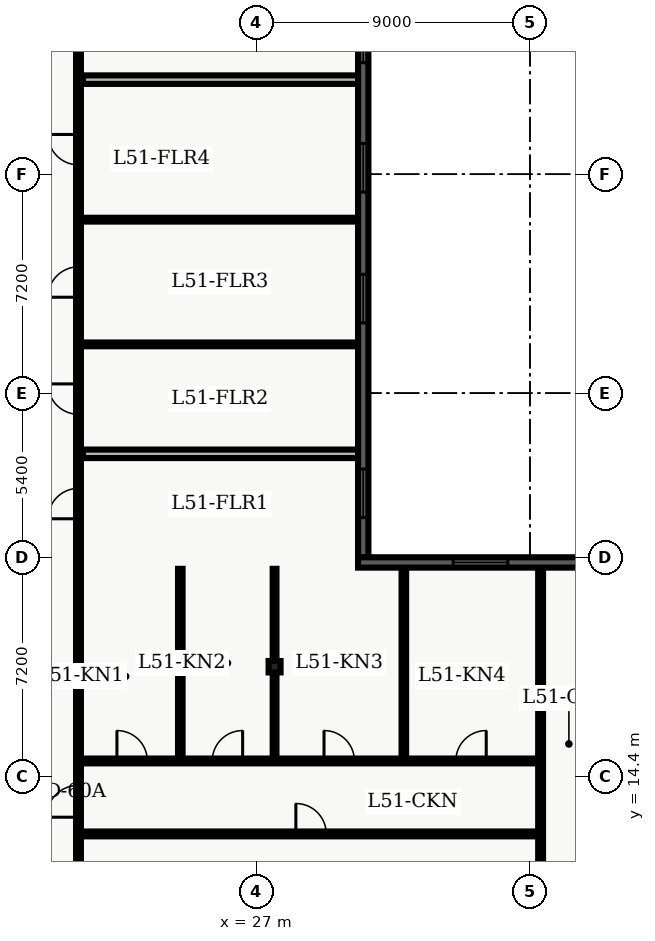
"""IFC4 building model, lengths in metres.
Left out: names, types, materials, properties, quantities, classifications, styles, units other than length and angle.
Written with IfcOpenShell. Run it as: python <this file> out.ifc"""

import sys

from ifc_helpers import new_model, entity, si_unit, converted_unit, direction, frame, origin_with_axes, origin_2d_with_axis, place, context, subcontext, project, spatial, polyline, rectangle, i_section, outline, extrude, element, fill, save


model = new_model("IFC4")
c1 = context("Model", 3, precision=1e-05, world=origin_with_axes(), true_north=direction((0.0, 1.0)))
c2 = subcontext(c1, "Body", "Model", "MODEL_VIEW")
j1 = project(units=[si_unit("LENGTHUNIT", "METRE"), converted_unit("PLANEANGLEUNIT", "DEGREE", entity("IfcPlaneAngleMeasure", 0.017), si_unit("PLANEANGLEUNIT", "RADIAN"), dimensions=[0, 0, 0, 0, 0, 0, 0])], contexts=[c1])
p1 = place(None, origin_with_axes())
s1 = spatial("IfcSite", under=j1, at=p1, CompositionType="ELEMENT")
p2 = place(p1, origin_with_axes())
s2 = spatial("IfcBuilding", under=s1, at=p2, CompositionType="ELEMENT")
p3 = place(p2, frame((0.0, 0.0, 208.2), z_axis=(0.0, 0.0, 1.0), x_axis=(1.0, 0.0, 0.0)))
s3 = spatial("IfcBuildingStorey", under=s2, at=p3, CompositionType="ELEMENT", Elevation=208.2)
p4 = place(p3, frame((27.6, 18.0, 0.0), z_axis=(0.0, 0.0, 1.0), x_axis=(1.0, 0.0, 0.0)))
e1 = element("IfcColumn", 1, at=p4, inside=s3, PredefinedType="COLUMN", context=c2, shape_type="SweptSolid", body=[
    extrude(i_section(OverallWidth=0.394, OverallDepth=0.375, WebThickness=0.017, FlangeThickness=0.028, FilletRadius=0.02, at=origin_2d_with_axis()), origin_with_axes(), (0.0, 0.0, 1.0), 3.9),
])
p5 = place(p3, frame((21.15, 7.8, 0.0), z_axis=(0.0, 0.0, 1.0), x_axis=(0.0, 1.0, 0.0)))
e2 = element("IfcWall", 2, at=p5, inside=s3, PredefinedType="PARTITIONING", context=c2, shape_type="SweptSolid", body=[
    extrude(outline(polyline([(0.0, -0.08), (32.7, -0.08), (32.7, 0.08), (0.0, 0.08), (0.0, -0.08)])), origin_with_axes(), (0.0, 0.0, 1.0), 2.7),
])
p6 = place(p5, frame((15.566, 0.0, 0.0), z_axis=(0.0, 0.0, 1.0), x_axis=(1.0, 0.0, 0.0)))
e3 = element("IfcOpeningElement", 3, at=p6, cuts=e2, PredefinedType="OPENING", context=c2, shape_type="SweptSolid", body=[
    extrude(rectangle(XDim=1.0, YDim=0.18, at=origin_2d_with_axis()), origin_with_axes(), (0.0, 0.0, 1.0), 2.15),
])
p7 = place(p5, frame((19.003, 0.0, 0.0), z_axis=(0.0, 0.0, 1.0), x_axis=(1.0, 0.0, 0.0)))
e4 = element("IfcOpeningElement", 4, at=p7, cuts=e2, PredefinedType="OPENING", context=c2, shape_type="SweptSolid", body=[
    extrude(rectangle(XDim=1.0, YDim=0.18, at=origin_2d_with_axis()), origin_with_axes(), (0.0, 0.0, 1.0), 2.15),
])
p8 = place(p5, frame((22.854, 0.0, 0.0), z_axis=(0.0, 0.0, 1.0), x_axis=(1.0, 0.0, 0.0)))
e5 = element("IfcOpeningElement", 5, at=p8, cuts=e2, PredefinedType="OPENING", context=c2, shape_type="SweptSolid", body=[
    extrude(rectangle(XDim=1.0, YDim=0.18, at=origin_2d_with_axis()), origin_with_axes(), (0.0, 0.0, 1.0), 2.15),
])
p9 = place(p5, frame((27.208, 0.0, 0.0), z_axis=(0.0, 0.0, 1.0), x_axis=(1.0, 0.0, 0.0)))
e6 = element("IfcOpeningElement", 6, at=p9, cuts=e2, PredefinedType="OPENING", context=c2, shape_type="SweptSolid", body=[
    extrude(rectangle(XDim=1.0, YDim=0.18, at=origin_2d_with_axis()), origin_with_axes(), (0.0, 0.0, 1.0), 2.15),
])
p10 = place(p5, frame((31.041, 0.0, 0.0), z_axis=(0.0, 0.0, 1.0), x_axis=(1.0, 0.0, 0.0)))
e7 = element("IfcOpeningElement", 7, at=p10, cuts=e2, PredefinedType="OPENING", context=c2, shape_type="SweptSolid", body=[
    extrude(rectangle(XDim=1.0, YDim=0.18, at=origin_2d_with_axis()), origin_with_axes(), (0.0, 0.0, 1.0), 2.15),
])
p11 = place(p5, frame((5.775, 0.0, 0.0), z_axis=(0.0, 0.0, 1.0), x_axis=(1.0, 0.0, 0.0)))
e8 = element("IfcOpeningElement", 8, at=p11, cuts=e2, PredefinedType="OPENING", context=c2, shape_type="SweptSolid", body=[
    extrude(rectangle(XDim=1.05, YDim=0.18, at=origin_2d_with_axis()), origin_with_axes(), (0.0, 0.0, 1.0), 2.15),
])
p12 = place(p3, frame((21.3, 25.003, 0.0), z_axis=(0.0, 0.0, 1.0), x_axis=(1.0, 0.0, 0.0)))
e9 = element("IfcWall", 9, at=p12, inside=s3, PredefinedType="PARTITIONING", context=c2, shape_type="SweptSolid", body=[
    extrude(outline(polyline([(0.0, -0.14), (9.051, -0.14), (9.051, 0.14), (0.0, 0.14), (0.0, -0.14)])), origin_with_axes(), (0.0, 0.0, 1.0), 2.7),
])
for number, where, z_axis, x_axis in (
    (10, (21.3, 28.603, 0.0), (0.0, 0.0, 1.0), (1.0, 0.0, 0.0)),
    (11, (21.3, 32.705, 0.0), (0.0, 0.0, 1.0), (1.0, 0.0, 0.0)),
):
    element("IfcWall", number, at=place(p3, frame(where, z_axis=z_axis, x_axis=x_axis)), inside=s3, PredefinedType="PARTITIONING", context=c2, shape_type="SweptSolid", body=[
        extrude(outline(polyline([(0.0, -0.062), (9.051, -0.062), (9.051, 0.062), (0.0, 0.062), (0.0, -0.062)])), origin_with_axes(), (0.0, 0.0, 1.0), 2.7),
    ])
p13 = place(p3, frame((21.3, 37.311, 0.0), z_axis=(0.0, 0.0, 1.0), x_axis=(1.0, 0.0, 0.0)))
e12 = element("IfcWall", 12, at=p13, inside=s3, PredefinedType="PARTITIONING", context=c2, shape_type="SweptSolid", body=[
    extrude(outline(polyline([(0.0, -0.14), (9.051, -0.14), (9.051, 0.14), (0.0, 0.14), (0.0, -0.14)])), origin_with_axes(), (0.0, 0.0, 1.0), 2.7),
])
p14 = place(p3, frame((21.15, 12.5, 0.0), z_axis=(0.0, 0.0, 1.0), x_axis=(1.0, 0.0, 0.0)))
e13 = element("IfcWall", 13, at=p14, inside=s3, PredefinedType="PARTITIONING", context=c2, shape_type="SweptSolid", body=[
    extrude(outline(polyline([(0.0, -0.08), (15.2, -0.08), (15.2, 0.08), (0.0, 0.08), (0.0, -0.08)])), origin_with_axes(), (0.0, 0.0, 1.0), 2.7),
])
p15 = place(p14, frame((7.65, 0.0, 0.0), z_axis=(0.0, 0.0, 1.0), x_axis=(1.0, 0.0, 0.0)))
e14 = element("IfcOpeningElement", 14, at=p15, cuts=e13, PredefinedType="OPENING", context=c2, shape_type="SweptSolid", body=[
    extrude(rectangle(XDim=1.0, YDim=0.18, at=origin_2d_with_axis()), origin_with_axes(), (0.0, 0.0, 1.0), 2.15),
])
p16 = place(p3, frame((21.15, 14.9, 0.0), z_axis=(0.0, 0.0, 1.0), x_axis=(1.0, 0.0, 0.0)))
e15 = element("IfcWall", 15, at=p16, inside=s3, PredefinedType="PARTITIONING", context=c2, shape_type="SweptSolid", body=[
    extrude(outline(polyline([(0.0, -0.08), (15.2, -0.08), (15.2, 0.08), (0.0, 0.08), (0.0, -0.08)])), origin_with_axes(), (0.0, 0.0, 1.0), 2.7),
])
p17 = place(p16, frame((1.764, 0.0, 0.0), z_axis=(0.0, 0.0, 1.0), x_axis=(1.0, 0.0, 0.0)))
e16 = element("IfcOpeningElement", 16, at=p17, cuts=e15, PredefinedType="OPENING", context=c2, shape_type="SweptSolid", body=[
    extrude(rectangle(XDim=1.0, YDim=0.18, at=origin_2d_with_axis()), origin_with_axes(), (0.0, 0.0, 1.0), 2.15),
])
p18 = place(p16, frame((4.899, 0.0, 0.0), z_axis=(0.0, 0.0, 1.0), x_axis=(1.0, 0.0, 0.0)))
e17 = element("IfcOpeningElement", 17, at=p18, cuts=e15, PredefinedType="OPENING", context=c2, shape_type="SweptSolid", body=[
    extrude(rectangle(XDim=1.0, YDim=0.18, at=origin_2d_with_axis()), origin_with_axes(), (0.0, 0.0, 1.0), 2.15),
])
p19 = place(p16, frame((8.576, 0.0, 0.0), z_axis=(0.0, 0.0, 1.0), x_axis=(1.0, 0.0, 0.0)))
e18 = element("IfcOpeningElement", 18, at=p19, cuts=e15, PredefinedType="OPENING", context=c2, shape_type="SweptSolid", body=[
    extrude(rectangle(XDim=1.0, YDim=0.18, at=origin_2d_with_axis()), origin_with_axes(), (0.0, 0.0, 1.0), 2.15),
])
p20 = place(p16, frame((12.911, 0.0, 0.0), z_axis=(0.0, 0.0, 1.0), x_axis=(1.0, 0.0, 0.0)))
e19 = element("IfcOpeningElement", 19, at=p20, cuts=e15, PredefinedType="OPENING", context=c2, shape_type="SweptSolid", body=[
    extrude(rectangle(XDim=1.0, YDim=0.18, at=origin_2d_with_axis()), origin_with_axes(), (0.0, 0.0, 1.0), 2.15),
])
p21 = place(p3, frame((36.35, 4.35, 0.0), z_axis=(0.0, 0.0, 1.0), x_axis=(0.0, 1.0, 0.0)))
e20 = element("IfcWall", 20, at=p21, inside=s3, PredefinedType="PARTITIONING", context=c2, shape_type="SweptSolid", body=[
    extrude(outline(polyline([(0.0, -0.08), (16.95, -0.08), (16.95, 0.08), (0.0, 0.08), (0.0, -0.08)])), origin_with_axes(), (0.0, 0.0, 1.0), 2.7),
])
p22 = place(p3, frame((24.499, 15.02, 0.0), z_axis=(0.0, 0.0, 1.0), x_axis=(0.0, 1.0, 0.0)))
e21 = element("IfcWall", 21, at=p22, inside=s3, PredefinedType="PARTITIONING", context=c2, shape_type="SweptSolid", body=[
    extrude(outline(polyline([(0.0, -0.075), (6.2, -0.075), (6.2, 0.075), (0.0, 0.075), (0.0, -0.075)])), origin_with_axes(), (0.0, 0.0, 1.0), 2.7),
])
p23 = place(p3, frame((27.6, 15.02, 0.0), z_axis=(0.0, 0.0, 1.0), x_axis=(0.0, 1.0, 0.0)))
e22 = element("IfcWall", 22, at=p23, inside=s3, PredefinedType="PARTITIONING", context=c2, shape_type="SweptSolid", body=[
    extrude(outline(polyline([(0.0, -0.062), (6.2, -0.062), (6.2, 0.062), (0.0, 0.062), (0.0, -0.062)])), origin_with_axes(), (0.0, 0.0, 1.0), 2.7),
])
p24 = place(p3, frame((31.852, 15.02, 0.0), z_axis=(0.0, 0.0, 1.0), x_axis=(0.0, 1.0, 0.0)))
e23 = element("IfcWall", 23, at=p24, inside=s3, PredefinedType="PARTITIONING", context=c2, shape_type="SweptSolid", body=[
    extrude(outline(polyline([(0.0, -0.075), (6.245, -0.075), (6.245, 0.075), (0.0, 0.075), (0.0, -0.075)])), origin_with_axes(), (0.0, 0.0, 1.0), 2.7),
])
p25 = place(p3, frame((30.516, 41.62, 0.0), z_axis=(0.0, 0.0, 1.0), x_axis=(0.0, -1.0, 0.0)))
e24 = element("IfcWall", 24, at=p25, inside=s3, PredefinedType="SOLIDWALL", context=c2, shape_type="SweptSolid", body=[
    extrude(outline(polyline([(0.0, -0.17), (20.02, -0.17), (20.02, 0.17), (0.0, 0.17), (0.0, -0.17)])), origin_with_axes(), (0.0, 0.0, 1.0), 3.66),
])
p26 = place(p25, frame((2.952, 0.0, 0.45), z_axis=(0.0, 0.0, 1.0), x_axis=(1.0, 0.0, 0.0)))
e25 = element("IfcOpeningElement", 25, at=p26, cuts=e24, PredefinedType="OPENING", context=c2, shape_type="SweptSolid", body=[
    extrude(rectangle(XDim=1.6, YDim=0.36, at=origin_2d_with_axis()), origin_with_axes(), (0.0, 0.0, 1.0), 2.2),
])
p27 = place(p25, frame((7.207, 0.0, 0.45), z_axis=(0.0, 0.0, 1.0), x_axis=(1.0, 0.0, 0.0)))
e26 = element("IfcOpeningElement", 26, at=p27, cuts=e24, PredefinedType="OPENING", context=c2, shape_type="SweptSolid", body=[
    extrude(rectangle(XDim=1.6, YDim=0.36, at=origin_2d_with_axis()), origin_with_axes(), (0.0, 0.0, 1.0), 2.2),
])
p28 = place(p25, frame((11.512, 0.0, 0.45), z_axis=(0.0, 0.0, 1.0), x_axis=(1.0, 0.0, 0.0)))
e27 = element("IfcOpeningElement", 27, at=p28, cuts=e24, PredefinedType="OPENING", context=c2, shape_type="SweptSolid", body=[
    extrude(rectangle(XDim=1.6, YDim=0.36, at=origin_2d_with_axis()), origin_with_axes(), (0.0, 0.0, 1.0), 2.2),
])
p29 = place(p25, frame((17.917, 0.0, 0.45), z_axis=(0.0, 0.0, 1.0), x_axis=(1.0, 0.0, 0.0)))
e28 = element("IfcOpeningElement", 28, at=p29, cuts=e24, PredefinedType="OPENING", context=c2, shape_type="SweptSolid", body=[
    extrude(rectangle(XDim=1.6, YDim=0.36, at=origin_2d_with_axis()), origin_with_axes(), (0.0, 0.0, 1.0), 2.2),
])
p30 = place(p3, frame((30.346, 21.43, 0.0), z_axis=(0.0, 0.0, 1.0), x_axis=(1.0, 0.0, 0.0)))
e29 = element("IfcWall", 29, at=p30, inside=s3, PredefinedType="SOLIDWALL", context=c2, shape_type="SweptSolid", body=[
    extrude(outline(polyline([(0.0, -0.17), (8.054, -0.17), (8.054, 0.17), (0.0, 0.17), (0.0, -0.17)])), origin_with_axes(), (0.0, 0.0, 1.0), 3.66),
])
p31 = place(p30, frame((4.027, 0.0, 0.45), z_axis=(0.0, 0.0, 1.0), x_axis=(1.0, 0.0, 0.0)))
e30 = element("IfcOpeningElement", 30, at=p31, cuts=e29, PredefinedType="OPENING", context=c2, shape_type="SweptSolid", body=[
    extrude(rectangle(XDim=1.8, YDim=0.36, at=origin_2d_with_axis()), origin_with_axes(), (0.0, 0.0, 1.0), 2.1),
])
p32 = place(p5, frame((15.566, 0.0, 0.0), z_axis=(0.0, 0.0, 1.0), x_axis=(1.0, 0.0, 0.0)))
e31 = element("IfcDoor", 31, at=p32, inside=s3, OperationType="SINGLE_SWING_LEFT", PredefinedType="DOOR", context=c2, shape_type="SweptSolid", body=[
    extrude(rectangle(XDim=1.0, YDim=0.09, at=origin_2d_with_axis()), origin_with_axes(), (0.0, 0.0, 1.0), 2.15),
])
fill(e3, e31)
p33 = place(p5, frame((19.003, 0.0, 0.0), z_axis=(0.0, 0.0, 1.0), x_axis=(1.0, 0.0, 0.0)))
e32 = element("IfcDoor", 32, at=p33, inside=s3, OperationType="SINGLE_SWING_RIGHT", PredefinedType="DOOR", context=c2, shape_type="SweptSolid", body=[
    extrude(rectangle(XDim=1.0, YDim=0.09, at=origin_2d_with_axis()), origin_with_axes(), (0.0, 0.0, 1.0), 2.15),
])
fill(e4, e32)
p34 = place(p5, frame((22.854, 0.0, 0.0), z_axis=(0.0, 0.0, 1.0), x_axis=(1.0, 0.0, 0.0)))
e33 = element("IfcDoor", 33, at=p34, inside=s3, OperationType="SINGLE_SWING_LEFT", PredefinedType="DOOR", context=c2, shape_type="SweptSolid", body=[
    extrude(rectangle(XDim=1.0, YDim=0.09, at=origin_2d_with_axis()), origin_with_axes(), (0.0, 0.0, 1.0), 2.15),
])
fill(e5, e33)
p35 = place(p5, frame((27.208, 0.0, 0.0), z_axis=(0.0, 0.0, 1.0), x_axis=(1.0, 0.0, 0.0)))
e34 = element("IfcDoor", 34, at=p35, inside=s3, OperationType="SINGLE_SWING_RIGHT", PredefinedType="DOOR", context=c2, shape_type="SweptSolid", body=[
    extrude(rectangle(XDim=1.0, YDim=0.09, at=origin_2d_with_axis()), origin_with_axes(), (0.0, 0.0, 1.0), 2.15),
])
fill(e6, e34)
p36 = place(p5, frame((5.775, 0.0, 0.0), z_axis=(0.0, 0.0, 1.0), x_axis=(1.0, 0.0, 0.0)))
e35 = element("IfcDoor", 35, at=p36, inside=s3, OperationType="SINGLE_SWING_LEFT", PredefinedType="DOOR", context=c2, shape_type="SweptSolid", body=[
    extrude(rectangle(XDim=1.05, YDim=0.09, at=origin_2d_with_axis()), origin_with_axes(), (0.0, 0.0, 1.0), 2.15),
])
fill(e8, e35)
p37 = place(p14, frame((7.65, 0.0, 0.0), z_axis=(0.0, 0.0, 1.0), x_axis=(1.0, 0.0, 0.0)))
e36 = element("IfcDoor", 36, at=p37, inside=s3, OperationType="SINGLE_SWING_LEFT", PredefinedType="DOOR", context=c2, shape_type="SweptSolid", body=[
    extrude(rectangle(XDim=1.0, YDim=0.09, at=origin_2d_with_axis()), origin_with_axes(), (0.0, 0.0, 1.0), 2.15),
])
fill(e14, e36)
p38 = place(p16, frame((1.764, 0.0, 0.0), z_axis=(0.0, 0.0, 1.0), x_axis=(1.0, 0.0, 0.0)))
e37 = element("IfcDoor", 37, at=p38, inside=s3, OperationType="SINGLE_SWING_LEFT", PredefinedType="DOOR", context=c2, shape_type="SweptSolid", body=[
    extrude(rectangle(XDim=1.0, YDim=0.09, at=origin_2d_with_axis()), origin_with_axes(), (0.0, 0.0, 1.0), 2.15),
])
fill(e16, e37)
p39 = place(p16, frame((4.899, 0.0, 0.0), z_axis=(0.0, 0.0, 1.0), x_axis=(1.0, 0.0, 0.0)))
e38 = element("IfcDoor", 38, at=p39, inside=s3, OperationType="SINGLE_SWING_RIGHT", PredefinedType="DOOR", context=c2, shape_type="SweptSolid", body=[
    extrude(rectangle(XDim=1.0, YDim=0.09, at=origin_2d_with_axis()), origin_with_axes(), (0.0, 0.0, 1.0), 2.15),
])
fill(e17, e38)
p40 = place(p16, frame((8.576, 0.0, 0.0), z_axis=(0.0, 0.0, 1.0), x_axis=(1.0, 0.0, 0.0)))
e39 = element("IfcDoor", 39, at=p40, inside=s3, OperationType="SINGLE_SWING_LEFT", PredefinedType="DOOR", context=c2, shape_type="SweptSolid", body=[
    extrude(rectangle(XDim=1.0, YDim=0.09, at=origin_2d_with_axis()), origin_with_axes(), (0.0, 0.0, 1.0), 2.15),
])
fill(e18, e39)
p41 = place(p16, frame((12.911, 0.0, 0.0), z_axis=(0.0, 0.0, 1.0), x_axis=(1.0, 0.0, 0.0)))
e40 = element("IfcDoor", 40, at=p41, inside=s3, OperationType="SINGLE_SWING_RIGHT", PredefinedType="DOOR", context=c2, shape_type="SweptSolid", body=[
    extrude(rectangle(XDim=1.0, YDim=0.09, at=origin_2d_with_axis()), origin_with_axes(), (0.0, 0.0, 1.0), 2.15),
])
fill(e19, e40)
p42 = place(p25, frame((2.952, 0.0, 0.45), z_axis=(0.0, 0.0, 1.0), x_axis=(1.0, 0.0, 0.0)))
e41 = element("IfcWindow", 41, at=p42, inside=s3, PredefinedType="WINDOW", context=c2, shape_type="SweptSolid", body=[
    extrude(rectangle(XDim=1.6, YDim=0.09, at=origin_2d_with_axis()), origin_with_axes(), (0.0, 0.0, 1.0), 2.2),
])
fill(e25, e41)
p43 = place(p25, frame((7.207, 0.0, 0.45), z_axis=(0.0, 0.0, 1.0), x_axis=(1.0, 0.0, 0.0)))
e42 = element("IfcWindow", 42, at=p43, inside=s3, PredefinedType="WINDOW", context=c2, shape_type="SweptSolid", body=[
    extrude(rectangle(XDim=1.6, YDim=0.09, at=origin_2d_with_axis()), origin_with_axes(), (0.0, 0.0, 1.0), 2.2),
])
fill(e26, e42)
p44 = place(p25, frame((11.512, 0.0, 0.45), z_axis=(0.0, 0.0, 1.0), x_axis=(1.0, 0.0, 0.0)))
e43 = element("IfcWindow", 43, at=p44, inside=s3, PredefinedType="WINDOW", context=c2, shape_type="SweptSolid", body=[
    extrude(rectangle(XDim=1.6, YDim=0.09, at=origin_2d_with_axis()), origin_with_axes(), (0.0, 0.0, 1.0), 2.2),
])
fill(e27, e43)
p45 = place(p25, frame((17.917, 0.0, 0.45), z_axis=(0.0, 0.0, 1.0), x_axis=(1.0, 0.0, 0.0)))
e44 = element("IfcWindow", 44, at=p45, inside=s3, PredefinedType="WINDOW", context=c2, shape_type="SweptSolid", body=[
    extrude(rectangle(XDim=1.6, YDim=0.09, at=origin_2d_with_axis()), origin_with_axes(), (0.0, 0.0, 1.0), 2.2),
])
fill(e28, e44)
p46 = place(p30, frame((4.027, 0.0, 0.45), z_axis=(0.0, 0.0, 1.0), x_axis=(1.0, 0.0, 0.0)))
e45 = element("IfcWindow", 45, at=p46, inside=s3, PredefinedType="WINDOW", context=c2, shape_type="SweptSolid", body=[
    extrude(rectangle(XDim=1.8, YDim=0.09, at=origin_2d_with_axis()), origin_with_axes(), (0.0, 0.0, 1.0), 2.1),
])
fill(e30, e45)
save(model, sys.argv[1])
